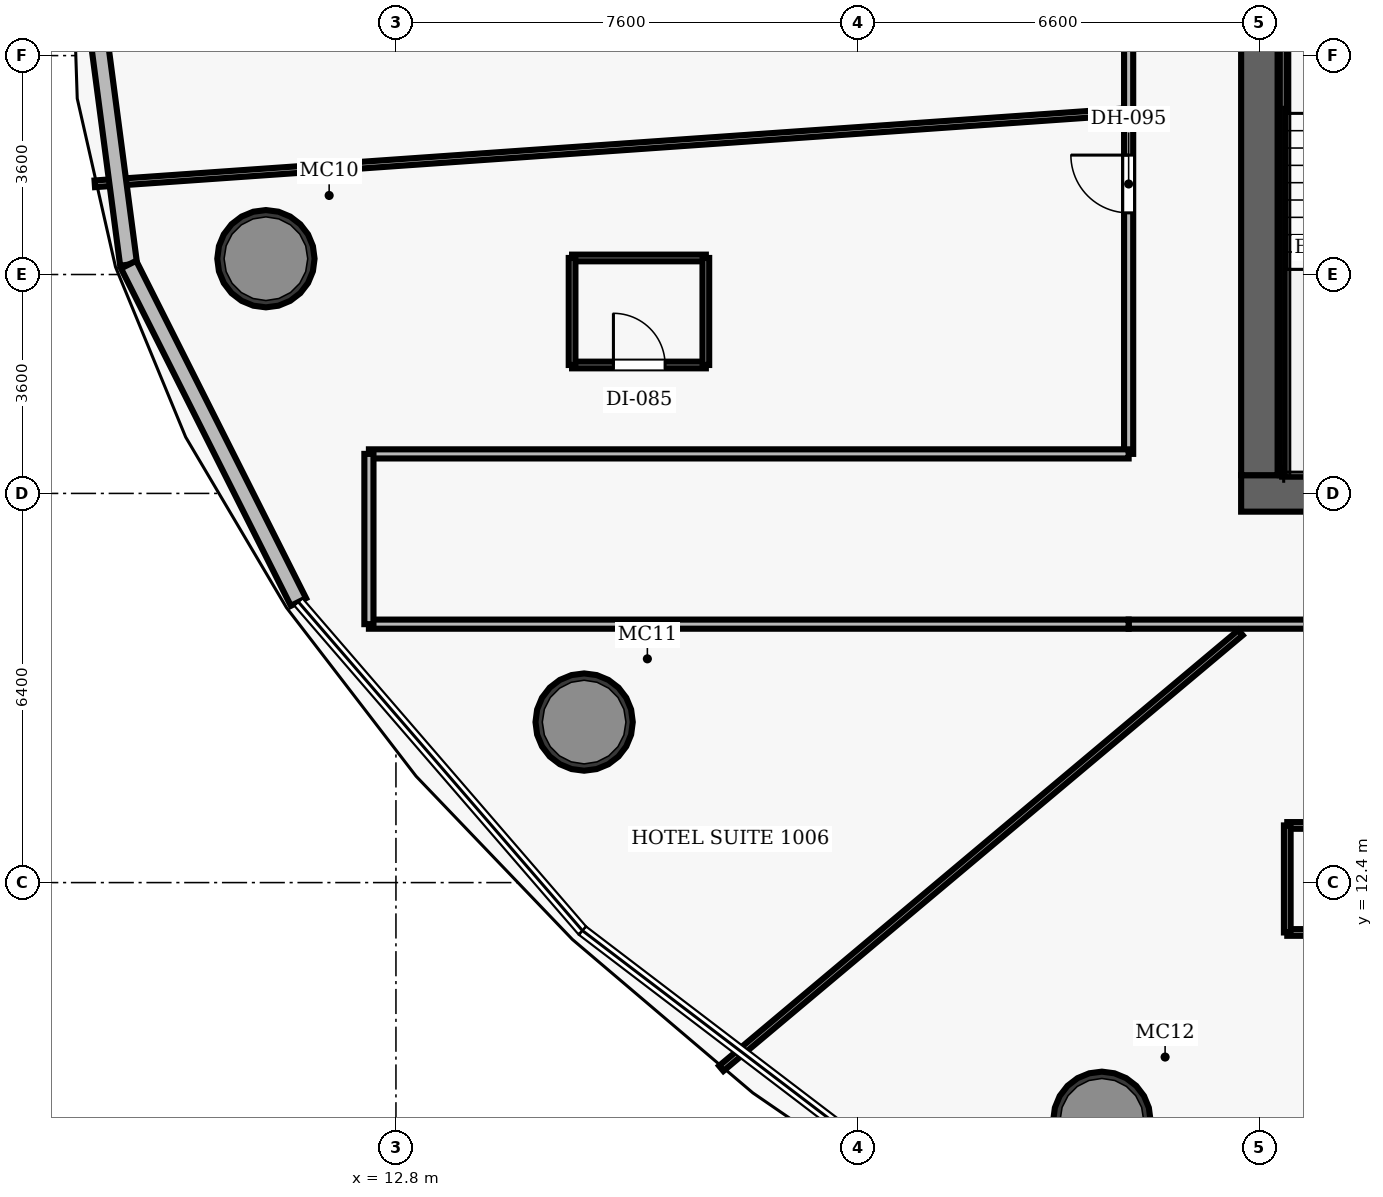
"""IFC4 building model, lengths in metres.
Left out: names, types, materials, properties, quantities, classifications, styles, units other than length and angle.
Written with IfcOpenShell. Run it as: python <this file> out.ifc"""

import sys

from ifc_helpers import new_model, si_unit, direction, frame, frame_2d, origin, origin_2d, place, context, subcontext, project, spatial, rectangle, hollow_circle, extrude, element, fill, save


model = new_model("IFC4")
c1 = context("Model", 3, precision=1e-05, world=origin(), true_north=direction((0.0, 1.0)))
c2 = subcontext(c1, "Body", "Model", "MODEL_VIEW")
j1 = project(units=[si_unit("LENGTHUNIT", "METRE"), si_unit("PLANEANGLEUNIT", "RADIAN")], contexts=[c1])
p1 = place(None, origin())
s1 = spatial("IfcSite", under=j1, at=p1, CompositionType="ELEMENT")
p2 = place(p1, origin())
s2 = spatial("IfcBuilding", under=s1, at=p2, CompositionType="ELEMENT")
p3 = place(p2, frame((0.0, 0.0, 51.9)))
s3 = spatial("IfcBuildingStorey", under=s2, at=p3, CompositionType="ELEMENT", Elevation=51.9)
p4 = place(p3, frame((26.7, 18.8, 0.0), z_axis=(0.0, 0.0, 1.0), x_axis=(1.0, 0.0, 0.0)))
e1 = element("IfcWall", 1, at=p4, inside=s3, PredefinedType="SHEAR", context=c2, shape_type="SweptSolid", body=[
    extrude(rectangle(XDim=22.6, YDim=0.6, at=frame_2d((11.3, 0.0))), origin(), (0.0, 0.0, 1.0), 3.5),
])
p5 = place(p4, frame((14.52, 0.0, 0.0)))
e2 = element("IfcOpeningElement", 2, at=p5, cuts=e1, PredefinedType="OPENING", context=c2, shape_type="SweptSolid", body=[
    extrude(rectangle(XDim=1.05, YDim=2.15, at=frame_2d((0.525, 1.075))), frame((0.0, 0.31, 0.0), z_axis=(0.0, -1.0, 0.0), x_axis=(1.0, 0.0, 0.0)), (0.0, 0.0, 1.0), 0.62),
])
p6 = place(p3, frame((27.0, 19.1, 0.0), z_axis=(0.0, 0.0, 1.0), x_axis=(0.0, 1.0, 0.0)))
e3 = element("IfcWall", 3, at=p6, inside=s3, PredefinedType="SHEAR", context=c2, shape_type="SweptSolid", body=[
    extrude(rectangle(XDim=13.8, YDim=0.6, at=frame_2d((6.9, 0.0))), origin(), (0.0, 0.0, 1.0), 3.5),
])
p7 = place(p6, frame((8.2, 0.0, 0.0)))
e4 = element("IfcOpeningElement", 4, at=p7, cuts=e3, PredefinedType="OPENING", context=c2, shape_type="SweptSolid", body=[
    extrude(rectangle(XDim=1.05, YDim=2.15, at=frame_2d((0.525, 1.075))), frame((0.0, 0.31, 0.0), z_axis=(0.0, -1.0, 0.0), x_axis=(1.0, 0.0, 0.0)), (0.0, 0.0, 1.0), 0.62),
])
for number, where, z_axis, x_axis in (
    (5, (10.661, 22.66, 0.0), (0.0, 0.0, 1.0), (1.0, 0.0, 0.0)),
    (6, (15.895, 15.04, 0.0), (0.0, 0.0, 1.0), (1.0, 0.0, 0.0)),
    (7, (24.41, 8.491, 0.0), (0.0, 0.0, 1.0), (1.0, 0.0, 0.0)),
):
    element("IfcColumn", number, at=place(p3, frame(where, z_axis=z_axis, x_axis=x_axis)), inside=s3, PredefinedType="COLUMN", context=c2, shape_type="SweptSolid", body=[
        extrude(hollow_circle(Radius=0.8, WallThickness=0.06, at=origin_2d()), origin(), (0.0, 0.0, 1.0), 3.5),
    ])
p8 = place(p3, frame((27.395, 19.1, 0.0), z_axis=(0.0, 0.0, 1.0), x_axis=(0.0, 1.0, 0.0)))
e8 = element("IfcWall", 8, at=p8, inside=s3, PredefinedType="SHEAR", context=c2, shape_type="SweptSolid", body=[
    extrude(rectangle(XDim=7.45, YDim=0.12, at=frame_2d((3.725, 0.0))), origin(), (0.0, 0.0, 1.0), 3.5),
])
p9 = place(p3, frame((27.395, 19.16, 0.0), z_axis=(0.0, 0.0, 1.0), x_axis=(1.0, 0.0, 0.0)))
e9 = element("IfcWall", 9, at=p9, inside=s3, PredefinedType="SHEAR", context=c2, shape_type="SweptSolid", body=[
    extrude(rectangle(XDim=3.095, YDim=0.12, at=frame_2d((1.547, 0.0))), origin(), (0.0, 0.0, 1.0), 3.5),
])
p10 = place(p3, frame((24.85, 16.65, 0.0), z_axis=(0.0, 0.0, 1.0), x_axis=(1.0, 0.0, 0.0)))
e10 = element("IfcWall", 10, at=p10, inside=s3, PredefinedType="PARTITIONING", context=c2, shape_type="SweptSolid", body=[
    extrude(rectangle(XDim=23.5, YDim=0.15, at=frame_2d((11.75, 0.0))), origin(), (0.0, 0.0, 1.0), 2.6),
])
p11 = place(p10, frame((8.216, 0.0, 0.0)))
e11 = element("IfcOpeningElement", 11, at=p11, cuts=e10, PredefinedType="OPENING", context=c2, shape_type="SweptSolid", body=[
    extrude(rectangle(XDim=0.95, YDim=2.15, at=frame_2d((0.475, 1.075))), frame((0.0, 0.085, 0.0), z_axis=(0.0, -1.0, 0.0), x_axis=(1.0, 0.0, 0.0)), (0.0, 0.0, 1.0), 0.17),
])
p12 = place(p10, frame((15.103, 0.0, 0.0)))
e12 = element("IfcOpeningElement", 12, at=p12, cuts=e10, PredefinedType="OPENING", context=c2, shape_type="SweptSolid", body=[
    extrude(rectangle(XDim=0.95, YDim=2.15, at=frame_2d((0.475, 1.075))), frame((0.0, 0.085, 0.0), z_axis=(0.0, -1.0, 0.0), x_axis=(1.0, 0.0, 0.0)), (0.0, 0.0, 1.0), 0.17),
])
p13 = place(p10, frame((17.91, 0.0, 0.0)))
e13 = element("IfcOpeningElement", 13, at=p13, cuts=e10, PredefinedType="OPENING", context=c2, shape_type="SweptSolid", body=[
    extrude(rectangle(XDim=0.95, YDim=2.15, at=frame_2d((0.475, 1.075))), frame((0.0, 0.085, 0.0), z_axis=(0.0, -1.0, 0.0), x_axis=(1.0, 0.0, 0.0)), (0.0, 0.0, 1.0), 0.17),
])
p14 = place(p3, frame((24.85, 19.45, 0.0), z_axis=(0.0, 0.0, 1.0), x_axis=(0.0, 1.0, 0.0)))
e14 = element("IfcWall", 14, at=p14, inside=s3, PredefinedType="PARTITIONING", context=c2, shape_type="SweptSolid", body=[
    extrude(rectangle(XDim=15.9, YDim=0.15, at=frame_2d((7.95, 0.0))), origin(), (0.0, 0.0, 1.0), 2.6),
])
p15 = place(p14, frame((7.305, 0.0, 0.0)))
e15 = element("IfcOpeningElement", 15, at=p15, cuts=e14, PredefinedType="OPENING", context=c2, shape_type="SweptSolid", body=[
    extrude(rectangle(XDim=0.95, YDim=2.15, at=frame_2d((0.475, 1.075))), frame((0.0, 0.085, 0.0), z_axis=(0.0, -1.0, 0.0), x_axis=(1.0, 0.0, 0.0)), (0.0, 0.0, 1.0), 0.17),
])
p16 = place(p14, frame((3.964, 0.0, 0.0)))
e16 = element("IfcOpeningElement", 16, at=p16, cuts=e14, PredefinedType="OPENING", context=c2, shape_type="SweptSolid", body=[
    extrude(rectangle(XDim=0.95, YDim=2.15, at=frame_2d((0.475, 1.075))), frame((0.0, 0.085, 0.0), z_axis=(0.0, -1.0, 0.0), x_axis=(1.0, 0.0, 0.0)), (0.0, 0.0, 1.0), 0.17),
])
for number, where, z_axis, x_axis in (
    (17, (12.355, 19.45, 0.0), (0.0, 0.0, 1.0), (1.0, 0.0, 0.0)),
    (18, (12.355, 16.65, 0.0), (0.0, 0.0, 1.0), (1.0, 0.0, 0.0)),
):
    element("IfcWall", number, at=place(p3, frame(where, z_axis=z_axis, x_axis=x_axis)), inside=s3, PredefinedType="PARTITIONING", context=c2, shape_type="SweptSolid", body=[
        extrude(rectangle(XDim=12.495, YDim=0.15, at=frame_2d((6.247, 0.0))), origin(), (0.0, 0.0, 1.0), 2.6),
    ])
p17 = place(p3, frame((12.355, 16.65, 0.0), z_axis=(0.0, 0.0, 1.0), x_axis=(0.0, 1.0, 0.0)))
e19 = element("IfcWall", 19, at=p17, inside=s3, PredefinedType="PARTITIONING", context=c2, shape_type="SweptSolid", body=[
    extrude(rectangle(XDim=2.8, YDim=0.15, at=frame_2d((1.4, 0.0))), origin(), (0.0, 0.0, 1.0), 2.6),
])
p18 = place(p3, frame((24.71, 25.071, 0.0), z_axis=(0.0, 0.0, 1.0), x_axis=(-0.997564034938, -0.069756692853, 0.0)))
e20 = element("IfcWall", 20, at=p18, inside=s3, PredefinedType="PARTITIONING", context=c2, shape_type="SweptSolid", body=[
    extrude(rectangle(XDim=16.905, YDim=0.11, at=frame_2d((8.452, 0.0))), origin(), (0.0, 0.0, 1.0), 2.6),
])
p19 = place(p3, frame((26.69, 16.51, 0.0), z_axis=(0.0, 0.0, 1.0), x_axis=(-0.766039528177, -0.642793467041, 0.0)))
e21 = element("IfcWall", 21, at=p19, inside=s3, PredefinedType="PARTITIONING", context=c2, shape_type="SweptSolid", body=[
    extrude(rectangle(XDim=11.149, YDim=0.11, at=frame_2d((5.574, 0.0))), origin(), (0.0, 0.0, 1.0), 2.6),
])
p20 = place(p3, frame((15.697, 20.912, 0.0), z_axis=(0.0, 0.0, 1.0), x_axis=(1.0, 0.0, 0.0)))
e22 = element("IfcWall", 22, at=p20, inside=s3, PredefinedType="PARTITIONING", context=c2, shape_type="SweptSolid", body=[
    extrude(rectangle(XDim=2.2, YDim=0.11, at=frame_2d((1.1, 0.0))), origin(), (0.0, 0.0, 1.0), 2.6),
])
p21 = place(p20, frame((0.68, 0.0, 0.0)))
e23 = element("IfcOpeningElement", 23, at=p21, cuts=e22, PredefinedType="OPENING", context=c2, shape_type="SweptSolid", body=[
    extrude(rectangle(XDim=0.85, YDim=2.1, at=frame_2d((0.425, 1.05))), frame((0.0, 0.065, 0.0), z_axis=(0.0, -1.0, 0.0), x_axis=(1.0, 0.0, 0.0)), (0.0, 0.0, 1.0), 0.13),
])
p22 = place(p3, frame((15.697, 22.672, 0.0), z_axis=(0.0, 0.0, 1.0), x_axis=(1.0, 0.0, 0.0)))
e24 = element("IfcWall", 24, at=p22, inside=s3, PredefinedType="PARTITIONING", context=c2, shape_type="SweptSolid", body=[
    extrude(rectangle(XDim=2.2, YDim=0.11, at=frame_2d((1.1, 0.0))), origin(), (0.0, 0.0, 1.0), 2.6),
])
for number, where, z_axis, x_axis in (
    (25, (15.697, 20.912, 0.0), (0.0, 0.0, 1.0), (0.0, 1.0, 0.0)),
    (26, (17.896, 20.912, 0.0), (0.0, 0.0, 1.0), (0.0, 1.0, 0.0)),
):
    element("IfcWall", number, at=place(p3, frame(where, z_axis=z_axis, x_axis=x_axis)), inside=s3, PredefinedType="PARTITIONING", context=c2, shape_type="SweptSolid", body=[
        extrude(rectangle(XDim=1.76, YDim=0.11, at=frame_2d((0.88, 0.0))), origin(), (0.0, 0.0, 1.0), 2.6),
    ])
p23 = place(p3, frame((27.459, 11.58, 0.0), z_axis=(0.0, 0.0, 1.0), x_axis=(1.0, 0.0, 0.0)))
e27 = element("IfcWall", 27, at=p23, inside=s3, PredefinedType="PARTITIONING", context=c2, shape_type="SweptSolid", body=[
    extrude(rectangle(XDim=2.2, YDim=0.11, at=frame_2d((1.1, 0.0))), origin(), (0.0, 0.0, 1.0), 2.6),
])
p24 = place(p23, frame((0.68, 0.0, 0.0)))
e28 = element("IfcOpeningElement", 28, at=p24, cuts=e27, PredefinedType="OPENING", context=c2, shape_type="SweptSolid", body=[
    extrude(rectangle(XDim=0.85, YDim=2.1, at=frame_2d((0.425, 1.05))), frame((0.0, 0.065, 0.0), z_axis=(0.0, -1.0, 0.0), x_axis=(1.0, 0.0, 0.0)), (0.0, 0.0, 1.0), 0.13),
])
p25 = place(p3, frame((27.459, 13.34, 0.0), z_axis=(0.0, 0.0, 1.0), x_axis=(1.0, 0.0, 0.0)))
e29 = element("IfcWall", 29, at=p25, inside=s3, PredefinedType="PARTITIONING", context=c2, shape_type="SweptSolid", body=[
    extrude(rectangle(XDim=2.2, YDim=0.11, at=frame_2d((1.1, 0.0))), origin(), (0.0, 0.0, 1.0), 2.6),
])
p26 = place(p3, frame((27.459, 11.58, 0.0), z_axis=(0.0, 0.0, 1.0), x_axis=(0.0, 1.0, 0.0)))
e30 = element("IfcWall", 30, at=p26, inside=s3, PredefinedType="PARTITIONING", context=c2, shape_type="SweptSolid", body=[
    extrude(rectangle(XDim=1.76, YDim=0.11, at=frame_2d((0.88, 0.0))), origin(), (0.0, 0.0, 1.0), 2.6),
])
p27 = place(p3, frame((8.403, 22.563, 0.0), z_axis=(0.0, 0.0, 1.0), x_axis=(-0.130345374551, 0.991468649698, 0.0)))
e31 = element("IfcWall", 31, at=p27, inside=s3, PredefinedType="SOLIDWALL", context=c2, shape_type="SweptSolid", body=[
    extrude(rectangle(XDim=5.497, YDim=0.28, at=frame_2d((2.749, 0.0))), origin(), (0.0, 0.0, 1.0), 3.25),
])
p28 = place(p3, frame((11.197, 17.014, 0.0), z_axis=(0.0, 0.0, 1.0), x_axis=(-0.449632845704, 0.893213470602, 0.0)))
e32 = element("IfcWall", 32, at=p28, inside=s3, PredefinedType="SOLIDWALL", context=c2, shape_type="SweptSolid", body=[
    extrude(rectangle(XDim=6.212, YDim=0.28, at=frame_2d((3.106, 0.0))), origin(), (0.0, 0.0, 1.0), 3.25),
])
p29 = place(p16, origin())
e33 = element("IfcDoor", 33, at=p29, inside=s3, OperationType="SINGLE_SWING_RIGHT", PredefinedType="DOOR", context=c2, shape_type="SweptSolid", body=[
    extrude(rectangle(XDim=0.95, YDim=2.15, at=frame_2d((0.475, 1.075))), frame((0.0, 0.025, 0.0), z_axis=(0.0, -1.0, 0.0), x_axis=(1.0, 0.0, 0.0)), (0.0, 0.0, 1.0), 0.05),
])
fill(e16, e33)
p30 = place(p21, origin())
e34 = element("IfcDoor", 34, at=p30, inside=s3, OperationType="SINGLE_SWING_LEFT", PredefinedType="DOOR", context=c2, shape_type="SweptSolid", body=[
    extrude(rectangle(XDim=0.85, YDim=2.1, at=frame_2d((0.425, 1.05))), frame((0.0, 0.025, 0.0), z_axis=(0.0, -1.0, 0.0), x_axis=(1.0, 0.0, 0.0)), (0.0, 0.0, 1.0), 0.05),
])
fill(e23, e34)
save(model, sys.argv[1])
